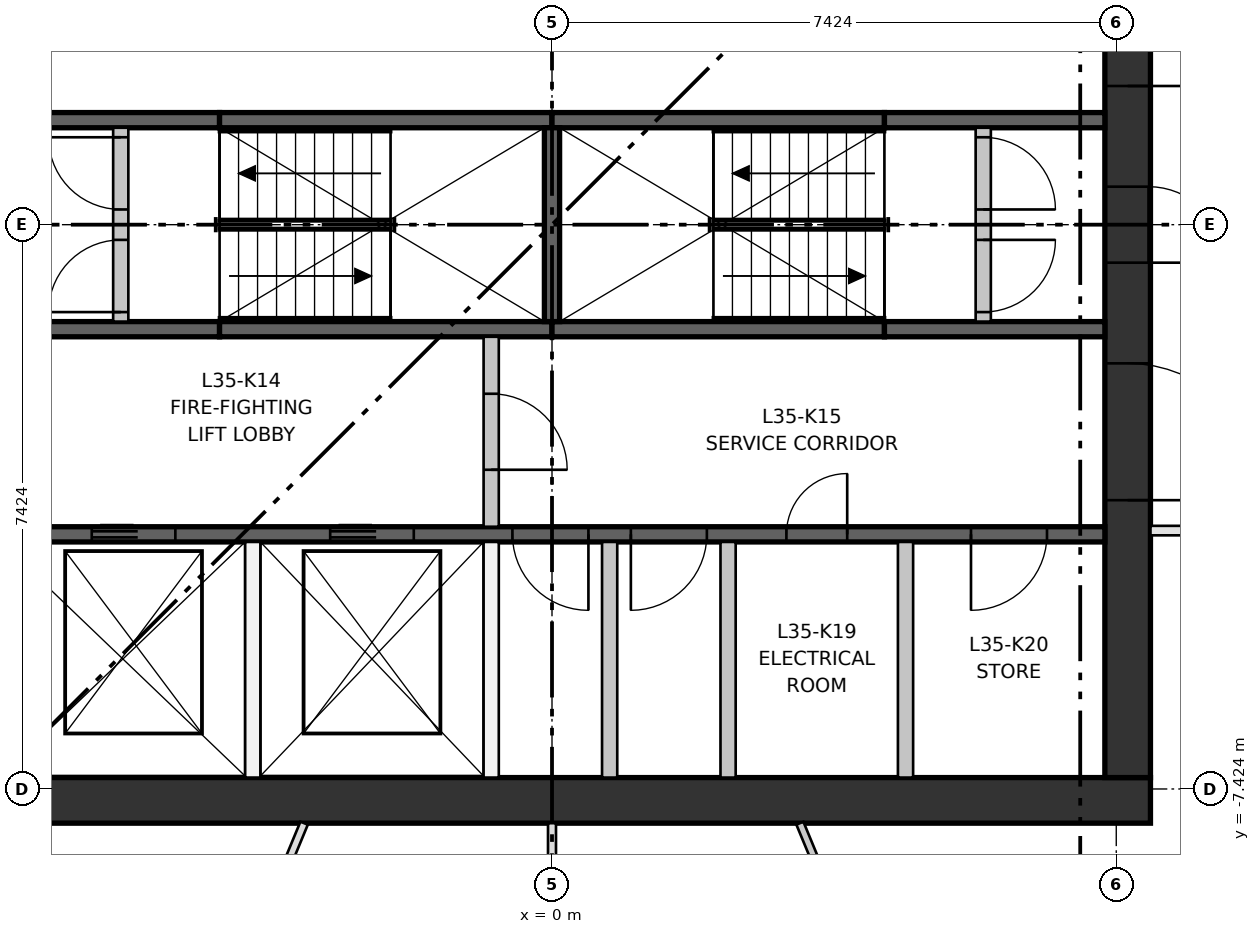
"""IFC4 building model, lengths in metres.
Left out: names, types, materials, properties, quantities, classifications, styles, units other than length and angle.
Written with IfcOpenShell. Run it as: python <this file> out.ifc"""

import sys

from ifc_helpers import new_model, si_unit, direction, frame, frame_2d, origin, place, context, subcontext, project, spatial, rectangle, extrude, element, fill, save


model = new_model("IFC4")
c1 = context("Model", 3, precision=1e-05, world=origin(), true_north=direction((0.0, 1.0)))
c2 = subcontext(c1, "Body", "Model", "MODEL_VIEW")
j1 = project(units=[si_unit("LENGTHUNIT", "METRE"), si_unit("PLANEANGLEUNIT", "RADIAN")], contexts=[c1])
p1 = place(None, origin())
s1 = spatial("IfcSite", under=j1, at=p1, CompositionType="ELEMENT")
p2 = place(p1, origin())
s2 = spatial("IfcBuilding", under=s1, at=p2, CompositionType="ELEMENT")
p3 = place(p2, frame((0.0, 0.0, 134.35)))
s3 = spatial("IfcBuildingStorey", under=s2, at=p3, CompositionType="ELEMENT", Elevation=134.35)
p4 = place(p3, frame((-7.874, -7.574, 0.0), z_axis=(0.0, 0.0, 1.0), x_axis=(1.0, 0.0, 0.0)))
e1 = element("IfcWall", 1, at=p4, inside=s3, PredefinedType="SHEAR", context=c2, shape_type="SweptSolid", body=[
    extrude(rectangle(XDim=15.748, YDim=0.6, at=frame_2d((7.874, 0.0))), origin(), (0.0, 0.0, 1.0), 3.35),
])
p5 = place(p3, frame((7.574, -7.274, 0.0), z_axis=(0.0, 0.0, 1.0), x_axis=(0.0, 1.0, 0.0)))
e2 = element("IfcWall", 2, at=p5, inside=s3, PredefinedType="SHEAR", context=c2, shape_type="SweptSolid", body=[
    extrude(rectangle(XDim=14.548, YDim=0.6, at=frame_2d((7.274, 0.0))), origin(), (0.0, 0.0, 1.0), 3.35),
])
p6 = place(p5, frame((6.774, 0.0, 0.0)))
e3 = element("IfcOpeningElement", 3, at=p6, cuts=e2, PredefinedType="OPENING", context=c2, shape_type="SweptSolid", body=[
    extrude(rectangle(XDim=1.0, YDim=2.1, at=frame_2d((0.5, 1.05))), frame((0.0, 0.31, 0.0), z_axis=(0.0, -1.0, 0.0), x_axis=(1.0, 0.0, 0.0)), (0.0, 0.0, 1.0), 0.62),
])
p7 = place(p5, frame((3.649, 0.0, 0.0)))
e4 = element("IfcOpeningElement", 4, at=p7, cuts=e2, PredefinedType="OPENING", context=c2, shape_type="SweptSolid", body=[
    extrude(rectangle(XDim=1.8, YDim=2.1, at=frame_2d((0.9, 1.05))), frame((0.0, 0.31, 0.0), z_axis=(0.0, -1.0, 0.0), x_axis=(1.0, 0.0, 0.0)), (0.0, 0.0, 1.0), 0.62),
])
p8 = place(p5, frame((9.098, 0.0, 0.0)))
e5 = element("IfcOpeningElement", 5, at=p8, cuts=e2, PredefinedType="OPENING", context=c2, shape_type="SweptSolid", body=[
    extrude(rectangle(XDim=1.8, YDim=2.1, at=frame_2d((0.9, 1.05))), frame((0.0, 0.31, 0.0), z_axis=(0.0, -1.0, 0.0), x_axis=(1.0, 0.0, 0.0)), (0.0, 0.0, 1.0), 0.62),
])
p9 = place(p3, frame((-7.274, -4.074, 0.0), z_axis=(0.0, 0.0, 1.0), x_axis=(1.0, 0.0, 0.0)))
e6 = element("IfcWall", 6, at=p9, inside=s3, PredefinedType="SHEAR", context=c2, shape_type="SweptSolid", body=[
    extrude(rectangle(XDim=14.548, YDim=0.2, at=frame_2d((7.274, 0.0))), origin(), (0.0, 0.0, 1.0), 3.0),
])
p10 = place(p9, frame((1.219, 0.0, 0.0)))
e7 = element("IfcOpeningElement", 7, at=p10, cuts=e6, PredefinedType="OPENING", context=c2, shape_type="SweptSolid", body=[
    extrude(rectangle(XDim=1.1, YDim=2.1, at=frame_2d((0.55, 1.05))), frame((0.0, 0.11, 0.0), z_axis=(0.0, -1.0, 0.0), x_axis=(1.0, 0.0, 0.0)), (0.0, 0.0, 1.0), 0.22),
])
p11 = place(p9, frame((4.355, 0.0, 0.0)))
e8 = element("IfcOpeningElement", 8, at=p11, cuts=e6, PredefinedType="OPENING", context=c2, shape_type="SweptSolid", body=[
    extrude(rectangle(XDim=1.1, YDim=2.1, at=frame_2d((0.55, 1.05))), frame((0.0, 0.11, 0.0), z_axis=(0.0, -1.0, 0.0), x_axis=(1.0, 0.0, 0.0)), (0.0, 0.0, 1.0), 0.22),
])
p12 = place(p9, frame((6.753, 0.0, 0.0)))
e9 = element("IfcOpeningElement", 9, at=p12, cuts=e6, PredefinedType="OPENING", context=c2, shape_type="SweptSolid", body=[
    extrude(rectangle(XDim=1.0, YDim=2.1, at=frame_2d((0.5, 1.05))), frame((0.0, 0.11, 0.0), z_axis=(0.0, -1.0, 0.0), x_axis=(1.0, 0.0, 0.0)), (0.0, 0.0, 1.0), 0.22),
])
p13 = place(p9, frame((8.312, 0.0, 0.0)))
e10 = element("IfcOpeningElement", 10, at=p13, cuts=e6, PredefinedType="OPENING", context=c2, shape_type="SweptSolid", body=[
    extrude(rectangle(XDim=1.0, YDim=2.1, at=frame_2d((0.5, 1.05))), frame((0.0, 0.11, 0.0), z_axis=(0.0, -1.0, 0.0), x_axis=(1.0, 0.0, 0.0)), (0.0, 0.0, 1.0), 0.22),
])
p14 = place(p9, frame((10.358, 0.0, 0.0)))
e11 = element("IfcOpeningElement", 11, at=p14, cuts=e6, PredefinedType="OPENING", context=c2, shape_type="SweptSolid", body=[
    extrude(rectangle(XDim=0.8, YDim=2.1, at=frame_2d((0.4, 1.05))), frame((0.0, 0.11, 0.0), z_axis=(0.0, -1.0, 0.0), x_axis=(1.0, 0.0, 0.0)), (0.0, 0.0, 1.0), 0.22),
])
p15 = place(p9, frame((12.787, 0.0, 0.0)))
e12 = element("IfcOpeningElement", 12, at=p15, cuts=e6, PredefinedType="OPENING", context=c2, shape_type="SweptSolid", body=[
    extrude(rectangle(XDim=1.0, YDim=2.1, at=frame_2d((0.5, 1.05))), frame((0.0, 0.11, 0.0), z_axis=(0.0, -1.0, 0.0), x_axis=(1.0, 0.0, 0.0)), (0.0, 0.0, 1.0), 0.22),
])
p16 = place(p3, frame((-7.274, -1.375, 0.0), z_axis=(0.0, 0.0, 1.0), x_axis=(1.0, 0.0, 0.0)))
e13 = element("IfcWall", 13, at=p16, inside=s3, PredefinedType="SHEAR", context=c2, shape_type="SweptSolid", body=[
    extrude(rectangle(XDim=2.9, YDim=0.2, at=frame_2d((1.45, 0.0))), origin(), (0.0, 0.0, 1.0), 3.0),
])
for number, where, z_axis, x_axis in (
    (14, (-4.374, -1.375, 0.0), (0.0, 0.0, 1.0), (1.0, 0.0, 0.0)),
    (15, (0.0, -1.375, 0.0), (0.0, 0.0, 1.0), (1.0, 0.0, 0.0)),
):
    element("IfcWall", number, at=place(p3, frame(where, z_axis=z_axis, x_axis=x_axis)), inside=s3, PredefinedType="SHEAR", context=c2, shape_type="SweptSolid", body=[
        extrude(rectangle(XDim=4.374, YDim=0.2, at=frame_2d((2.187, 0.0))), origin(), (0.0, 0.0, 1.0), 3.0),
    ])
for number, where, z_axis, x_axis in (
    (16, (4.374, -1.375, 0.0), (0.0, 0.0, 1.0), (1.0, 0.0, 0.0)),
    (17, (-7.274, 1.375, 0.0), (0.0, 0.0, 1.0), (1.0, 0.0, 0.0)),
):
    element("IfcWall", number, at=place(p3, frame(where, z_axis=z_axis, x_axis=x_axis)), inside=s3, PredefinedType="SHEAR", context=c2, shape_type="SweptSolid", body=[
        extrude(rectangle(XDim=2.9, YDim=0.2, at=frame_2d((1.45, 0.0))), origin(), (0.0, 0.0, 1.0), 3.0),
    ])
for number, where, z_axis, x_axis in (
    (18, (-4.374, 1.375, 0.0), (0.0, 0.0, 1.0), (1.0, 0.0, 0.0)),
    (19, (0.0, 1.375, 0.0), (0.0, 0.0, 1.0), (1.0, 0.0, 0.0)),
):
    element("IfcWall", number, at=place(p3, frame(where, z_axis=z_axis, x_axis=x_axis)), inside=s3, PredefinedType="SHEAR", context=c2, shape_type="SweptSolid", body=[
        extrude(rectangle(XDim=4.374, YDim=0.2, at=frame_2d((2.187, 0.0))), origin(), (0.0, 0.0, 1.0), 3.0),
    ])
p17 = place(p3, frame((4.374, 1.375, 0.0), z_axis=(0.0, 0.0, 1.0), x_axis=(1.0, 0.0, 0.0)))
e20 = element("IfcWall", 20, at=p17, inside=s3, PredefinedType="SHEAR", context=c2, shape_type="SweptSolid", body=[
    extrude(rectangle(XDim=2.9, YDim=0.2, at=frame_2d((1.45, 0.0))), origin(), (0.0, 0.0, 1.0), 3.0),
])
p18 = place(p3, frame((0.0, -1.275, 0.0), z_axis=(0.0, 0.0, 1.0), x_axis=(0.0, 1.0, 0.0)))
e21 = element("IfcWall", 21, at=p18, inside=s3, PredefinedType="SHEAR", context=c2, shape_type="SweptSolid", body=[
    extrude(rectangle(XDim=2.55, YDim=0.2, at=frame_2d((1.275, 0.0))), origin(), (0.0, 0.0, 1.0), 3.0),
])
for number, where, z_axis, x_axis in (
    (22, (-3.937, -7.274, 0.0), (0.0, 0.0, 1.0), (0.0, 1.0, 0.0)),
    (23, (-0.8, -7.274, 0.0), (0.0, 0.0, 1.0), (0.0, 1.0, 0.0)),
):
    element("IfcWall", number, at=place(p3, frame(where, z_axis=z_axis, x_axis=x_axis)), inside=s3, PredefinedType="PARTITIONING", context=c2, shape_type="SweptSolid", body=[
        extrude(rectangle(XDim=3.1, YDim=0.2, at=frame_2d((1.55, 0.0))), origin(), (0.0, 0.0, 1.0), 3.0),
    ])
p19 = place(p3, frame((-0.8, -3.974, 0.0), z_axis=(0.0, 0.0, 1.0), x_axis=(0.0, 1.0, 0.0)))
e24 = element("IfcWall", 24, at=p19, inside=s3, PredefinedType="PARTITIONING", context=c2, shape_type="SweptSolid", body=[
    extrude(rectangle(XDim=2.499, YDim=0.2, at=frame_2d((1.25, 0.0))), origin(), (0.0, 0.0, 1.0), 3.0),
])
p20 = place(p19, frame((0.75, 0.0, 0.0)))
e25 = element("IfcOpeningElement", 25, at=p20, cuts=e24, PredefinedType="OPENING", context=c2, shape_type="SweptSolid", body=[
    extrude(rectangle(XDim=1.0, YDim=2.1, at=frame_2d((0.5, 1.05))), frame((0.0, 0.11, 0.0), z_axis=(0.0, -1.0, 0.0), x_axis=(1.0, 0.0, 0.0)), (0.0, 0.0, 1.0), 0.22),
])
for number, where, z_axis, x_axis in (
    (26, (0.758, -7.274, 0.0), (0.0, 0.0, 1.0), (0.0, 1.0, 0.0)),
    (27, (2.317, -7.274, 0.0), (0.0, 0.0, 1.0), (0.0, 1.0, 0.0)),
    (28, (4.651, -7.274, 0.0), (0.0, 0.0, 1.0), (0.0, 1.0, 0.0)),
):
    element("IfcWall", number, at=place(p3, frame(where, z_axis=z_axis, x_axis=x_axis)), inside=s3, PredefinedType="PARTITIONING", context=c2, shape_type="SweptSolid", body=[
        extrude(rectangle(XDim=3.1, YDim=0.2, at=frame_2d((1.55, 0.0))), origin(), (0.0, 0.0, 1.0), 3.0),
    ])
p21 = place(p3, frame((-5.674, -1.275, 0.0), z_axis=(0.0, 0.0, 1.0), x_axis=(0.0, 1.0, 0.0)))
e29 = element("IfcWall", 29, at=p21, inside=s3, PredefinedType="PARTITIONING", context=c2, shape_type="SweptSolid", body=[
    extrude(rectangle(XDim=2.55, YDim=0.2, at=frame_2d((1.275, 0.0))), origin(), (0.0, 0.0, 1.0), 3.0),
])
p22 = place(p21, frame((0.125, 0.0, 0.0)))
e30 = element("IfcOpeningElement", 30, at=p22, cuts=e29, PredefinedType="OPENING", context=c2, shape_type="SweptSolid", body=[
    extrude(rectangle(XDim=0.95, YDim=2.1, at=frame_2d((0.475, 1.05))), frame((0.0, 0.11, 0.0), z_axis=(0.0, -1.0, 0.0), x_axis=(1.0, 0.0, 0.0)), (0.0, 0.0, 1.0), 0.22),
])
p23 = place(p21, frame((1.475, 0.0, 0.0)))
e31 = element("IfcOpeningElement", 31, at=p23, cuts=e29, PredefinedType="OPENING", context=c2, shape_type="SweptSolid", body=[
    extrude(rectangle(XDim=0.95, YDim=2.1, at=frame_2d((0.475, 1.05))), frame((0.0, 0.11, 0.0), z_axis=(0.0, -1.0, 0.0), x_axis=(1.0, 0.0, 0.0)), (0.0, 0.0, 1.0), 0.22),
])
p24 = place(p3, frame((5.674, -1.275, 0.0), z_axis=(0.0, 0.0, 1.0), x_axis=(0.0, 1.0, 0.0)))
e32 = element("IfcWall", 32, at=p24, inside=s3, PredefinedType="PARTITIONING", context=c2, shape_type="SweptSolid", body=[
    extrude(rectangle(XDim=2.55, YDim=0.2, at=frame_2d((1.275, 0.0))), origin(), (0.0, 0.0, 1.0), 3.0),
])
p25 = place(p24, frame((0.125, 0.0, 0.0)))
e33 = element("IfcOpeningElement", 33, at=p25, cuts=e32, PredefinedType="OPENING", context=c2, shape_type="SweptSolid", body=[
    extrude(rectangle(XDim=0.95, YDim=2.1, at=frame_2d((0.475, 1.05))), frame((0.0, 0.11, 0.0), z_axis=(0.0, -1.0, 0.0), x_axis=(1.0, 0.0, 0.0)), (0.0, 0.0, 1.0), 0.22),
])
p26 = place(p24, frame((1.475, 0.0, 0.0)))
e34 = element("IfcOpeningElement", 34, at=p26, cuts=e32, PredefinedType="OPENING", context=c2, shape_type="SweptSolid", body=[
    extrude(rectangle(XDim=0.95, YDim=2.1, at=frame_2d((0.475, 1.05))), frame((0.0, 0.11, 0.0), z_axis=(0.0, -1.0, 0.0), x_axis=(1.0, 0.0, 0.0)), (0.0, 0.0, 1.0), 0.22),
])
p27 = place(p3, frame((12.857, -4.024, 0.0), z_axis=(0.0, 0.0, 1.0), x_axis=(-1.0, 0.0, 0.0)))
e35 = element("IfcWall", 35, at=p27, inside=s3, PredefinedType="PARTITIONING", context=c2, shape_type="SweptSolid", body=[
    extrude(rectangle(XDim=4.983, YDim=0.125, at=frame_2d((2.491, 0.0))), origin(), (0.0, 0.0, 1.0), 3.0),
])
p28 = place(p27, frame((1.6, 0.0, 0.0)))
e36 = element("IfcOpeningElement", 36, at=p28, cuts=e35, PredefinedType="OPENING", context=c2, shape_type="SweptSolid", body=[
    extrude(rectangle(XDim=1.8, YDim=2.1, at=frame_2d((0.9, 1.05))), frame((0.0, 0.073, 0.0), z_axis=(0.0, -1.0, 0.0), x_axis=(1.0, 0.0, 0.0)), (0.0, 0.0, 1.0), 0.145),
])
p29 = place(p3, frame((-3.261, -7.874, 0.0), z_axis=(0.0, 0.0, 1.0), x_axis=(-0.382681880818, -0.923880175181, 0.0)))
e37 = element("IfcWall", 37, at=p29, inside=s3, PredefinedType="PARTITIONING", context=c2, shape_type="SweptSolid", body=[
    extrude(rectangle(XDim=5.857, YDim=0.105, at=frame_2d((2.929, 0.0))), origin(), (0.0, 0.0, 1.0), 3.0),
])
p30 = place(p29, frame((2.4, 0.0, 0.0)))
e38 = element("IfcOpeningElement", 38, at=p30, cuts=e37, PredefinedType="OPENING", context=c2, shape_type="SweptSolid", body=[
    extrude(rectangle(XDim=1.0, YDim=2.1, at=frame_2d((0.5, 1.05))), frame((0.0, 0.062, 0.0), z_axis=(0.0, -1.0, 0.0), x_axis=(1.0, 0.0, 0.0)), (0.0, 0.0, 1.0), 0.125),
])
p31 = place(p3, frame((0.0, -7.874, 0.0), z_axis=(0.0, 0.0, 1.0), x_axis=(0.0, -1.0, 0.0)))
e39 = element("IfcWall", 39, at=p31, inside=s3, PredefinedType="PARTITIONING", context=c2, shape_type="SweptSolid", body=[
    extrude(rectangle(XDim=6.506, YDim=0.105, at=frame_2d((3.253, 0.0))), origin(), (0.0, 0.0, 1.0), 3.0),
])
p32 = place(p3, frame((5.503, -13.285, 0.0), z_axis=(0.0, 0.0, 1.0), x_axis=(-0.382681880818, 0.923880175181, 0.0)))
e40 = element("IfcWall", 40, at=p32, inside=s3, PredefinedType="PARTITIONING", context=c2, shape_type="SweptSolid", body=[
    extrude(rectangle(XDim=5.857, YDim=0.1, at=frame_2d((2.929, 0.0))), origin(), (0.0, 0.0, 1.0), 3.0),
])
p33 = place(p32, frame((2.4, 0.0, 0.0)))
e41 = element("IfcOpeningElement", 41, at=p33, cuts=e40, PredefinedType="OPENING", context=c2, shape_type="SweptSolid", body=[
    extrude(rectangle(XDim=1.0, YDim=2.1, at=frame_2d((0.5, 1.05))), frame((0.0, 0.06, 0.0), z_axis=(0.0, -1.0, 0.0), x_axis=(1.0, 0.0, 0.0)), (0.0, 0.0, 1.0), 0.12),
])
p34 = place(p10, origin())
e42 = element("IfcDoor", 42, at=p34, inside=s3, OperationType="DOUBLE_DOOR_SLIDING", PredefinedType="DOOR", context=c2, shape_type="SweptSolid", body=[
    extrude(rectangle(XDim=1.1, YDim=2.1, at=frame_2d((0.55, 1.05))), frame((0.0, 0.025, 0.0), z_axis=(0.0, -1.0, 0.0), x_axis=(1.0, 0.0, 0.0)), (0.0, 0.0, 1.0), 0.05),
])
fill(e7, e42)
p35 = place(p11, origin())
e43 = element("IfcDoor", 43, at=p35, inside=s3, OperationType="DOUBLE_DOOR_SLIDING", PredefinedType="DOOR", context=c2, shape_type="SweptSolid", body=[
    extrude(rectangle(XDim=1.1, YDim=2.1, at=frame_2d((0.55, 1.05))), frame((0.0, 0.025, 0.0), z_axis=(0.0, -1.0, 0.0), x_axis=(1.0, 0.0, 0.0)), (0.0, 0.0, 1.0), 0.05),
])
fill(e8, e43)
p36 = place(p22, origin())
e44 = element("IfcDoor", 44, at=p36, inside=s3, OperationType="SINGLE_SWING_LEFT", PredefinedType="DOOR", context=c2, shape_type="SweptSolid", body=[
    extrude(rectangle(XDim=0.95, YDim=2.1, at=frame_2d((0.475, 1.05))), frame((0.0, 0.025, 0.0), z_axis=(0.0, -1.0, 0.0), x_axis=(1.0, 0.0, 0.0)), (0.0, 0.0, 1.0), 0.05),
])
fill(e30, e44)
p37 = place(p23, origin())
e45 = element("IfcDoor", 45, at=p37, inside=s3, OperationType="SINGLE_SWING_RIGHT", PredefinedType="DOOR", context=c2, shape_type="SweptSolid", body=[
    extrude(rectangle(XDim=0.95, YDim=2.1, at=frame_2d((0.475, 1.05))), frame((0.0, 0.025, 0.0), z_axis=(0.0, -1.0, 0.0), x_axis=(1.0, 0.0, 0.0)), (0.0, 0.0, 1.0), 0.05),
])
fill(e31, e45)
p38 = place(p25, frame((0.95, 0.0, 0.0), z_axis=(0.0, 0.0, 1.0), x_axis=(-1.0, 0.0, 0.0)))
e46 = element("IfcDoor", 46, at=p38, inside=s3, OperationType="SINGLE_SWING_RIGHT", PredefinedType="DOOR", context=c2, shape_type="SweptSolid", body=[
    extrude(rectangle(XDim=0.95, YDim=2.1, at=frame_2d((0.475, 1.05))), frame((0.0, 0.025, 0.0), z_axis=(0.0, -1.0, 0.0), x_axis=(1.0, 0.0, 0.0)), (0.0, 0.0, 1.0), 0.05),
])
fill(e33, e46)
p39 = place(p26, frame((0.95, 0.0, 0.0), z_axis=(0.0, 0.0, 1.0), x_axis=(-1.0, 0.0, 0.0)))
e47 = element("IfcDoor", 47, at=p39, inside=s3, OperationType="SINGLE_SWING_LEFT", PredefinedType="DOOR", context=c2, shape_type="SweptSolid", body=[
    extrude(rectangle(XDim=0.95, YDim=2.1, at=frame_2d((0.475, 1.05))), frame((0.0, 0.025, 0.0), z_axis=(0.0, -1.0, 0.0), x_axis=(1.0, 0.0, 0.0)), (0.0, 0.0, 1.0), 0.05),
])
fill(e34, e47)
p40 = place(p20, frame((1.0, 0.0, 0.0), z_axis=(0.0, 0.0, 1.0), x_axis=(-1.0, 0.0, 0.0)))
e48 = element("IfcDoor", 48, at=p40, inside=s3, OperationType="SINGLE_SWING_LEFT", PredefinedType="DOOR", context=c2, shape_type="SweptSolid", body=[
    extrude(rectangle(XDim=1.0, YDim=2.1, at=frame_2d((0.5, 1.05))), frame((0.0, 0.025, 0.0), z_axis=(0.0, -1.0, 0.0), x_axis=(1.0, 0.0, 0.0)), (0.0, 0.0, 1.0), 0.05),
])
fill(e25, e48)
p41 = place(p12, frame((1.0, 0.0, 0.0), z_axis=(0.0, 0.0, 1.0), x_axis=(-1.0, 0.0, 0.0)))
e49 = element("IfcDoor", 49, at=p41, inside=s3, OperationType="SINGLE_SWING_RIGHT", PredefinedType="DOOR", context=c2, shape_type="SweptSolid", body=[
    extrude(rectangle(XDim=1.0, YDim=2.1, at=frame_2d((0.5, 1.05))), frame((0.0, 0.025, 0.0), z_axis=(0.0, -1.0, 0.0), x_axis=(1.0, 0.0, 0.0)), (0.0, 0.0, 1.0), 0.05),
])
fill(e9, e49)
p42 = place(p13, frame((1.0, 0.0, 0.0), z_axis=(0.0, 0.0, 1.0), x_axis=(-1.0, 0.0, 0.0)))
e50 = element("IfcDoor", 50, at=p42, inside=s3, OperationType="SINGLE_SWING_LEFT", PredefinedType="DOOR", context=c2, shape_type="SweptSolid", body=[
    extrude(rectangle(XDim=1.0, YDim=2.1, at=frame_2d((0.5, 1.05))), frame((0.0, 0.025, 0.0), z_axis=(0.0, -1.0, 0.0), x_axis=(1.0, 0.0, 0.0)), (0.0, 0.0, 1.0), 0.05),
])
fill(e10, e50)
p43 = place(p14, origin())
e51 = element("IfcDoor", 51, at=p43, inside=s3, OperationType="SINGLE_SWING_RIGHT", PredefinedType="DOOR", context=c2, shape_type="SweptSolid", body=[
    extrude(rectangle(XDim=0.8, YDim=2.1, at=frame_2d((0.4, 1.05))), frame((0.0, 0.025, 0.0), z_axis=(0.0, -1.0, 0.0), x_axis=(1.0, 0.0, 0.0)), (0.0, 0.0, 1.0), 0.05),
])
fill(e11, e51)
p44 = place(p15, frame((1.0, 0.0, 0.0), z_axis=(0.0, 0.0, 1.0), x_axis=(-1.0, 0.0, 0.0)))
e52 = element("IfcDoor", 52, at=p44, inside=s3, OperationType="SINGLE_SWING_LEFT", PredefinedType="DOOR", context=c2, shape_type="SweptSolid", body=[
    extrude(rectangle(XDim=1.0, YDim=2.1, at=frame_2d((0.5, 1.05))), frame((0.0, 0.025, 0.0), z_axis=(0.0, -1.0, 0.0), x_axis=(1.0, 0.0, 0.0)), (0.0, 0.0, 1.0), 0.05),
])
fill(e12, e52)
p45 = place(p6, frame((1.0, 0.0, 0.0), z_axis=(0.0, 0.0, 1.0), x_axis=(-1.0, 0.0, 0.0)))
e53 = element("IfcDoor", 53, at=p45, inside=s3, OperationType="SINGLE_SWING_LEFT", PredefinedType="DOOR", context=c2, shape_type="SweptSolid", body=[
    extrude(rectangle(XDim=1.0, YDim=2.1, at=frame_2d((0.5, 1.05))), frame((0.0, 0.3, 0.0), z_axis=(0.0, -1.0, 0.0), x_axis=(1.0, 0.0, 0.0)), (0.0, 0.0, 1.0), 0.05),
])
fill(e3, e53)
p46 = place(p7, frame((1.8, 0.0, 0.0), z_axis=(0.0, 0.0, 1.0), x_axis=(-1.0, 0.0, 0.0)))
e54 = element("IfcDoor", 54, at=p46, inside=s3, OperationType="DOUBLE_DOOR_SINGLE_SWING", PredefinedType="DOOR", context=c2, shape_type="SweptSolid", body=[
    extrude(rectangle(XDim=1.8, YDim=2.1, at=frame_2d((0.9, 1.05))), frame((0.0, 0.025, 0.0), z_axis=(0.0, -1.0, 0.0), x_axis=(1.0, 0.0, 0.0)), (0.0, 0.0, 1.0), 0.05),
])
fill(e4, e54)
p47 = place(p8, frame((1.8, 0.0, 0.0), z_axis=(0.0, 0.0, 1.0), x_axis=(-1.0, 0.0, 0.0)))
e55 = element("IfcDoor", 55, at=p47, inside=s3, OperationType="DOUBLE_DOOR_SINGLE_SWING", PredefinedType="DOOR", context=c2, shape_type="SweptSolid", body=[
    extrude(rectangle(XDim=1.8, YDim=2.1, at=frame_2d((0.9, 1.05))), frame((0.0, 0.025, 0.0), z_axis=(0.0, -1.0, 0.0), x_axis=(1.0, 0.0, 0.0)), (0.0, 0.0, 1.0), 0.05),
])
fill(e5, e55)
save(model, sys.argv[1])
